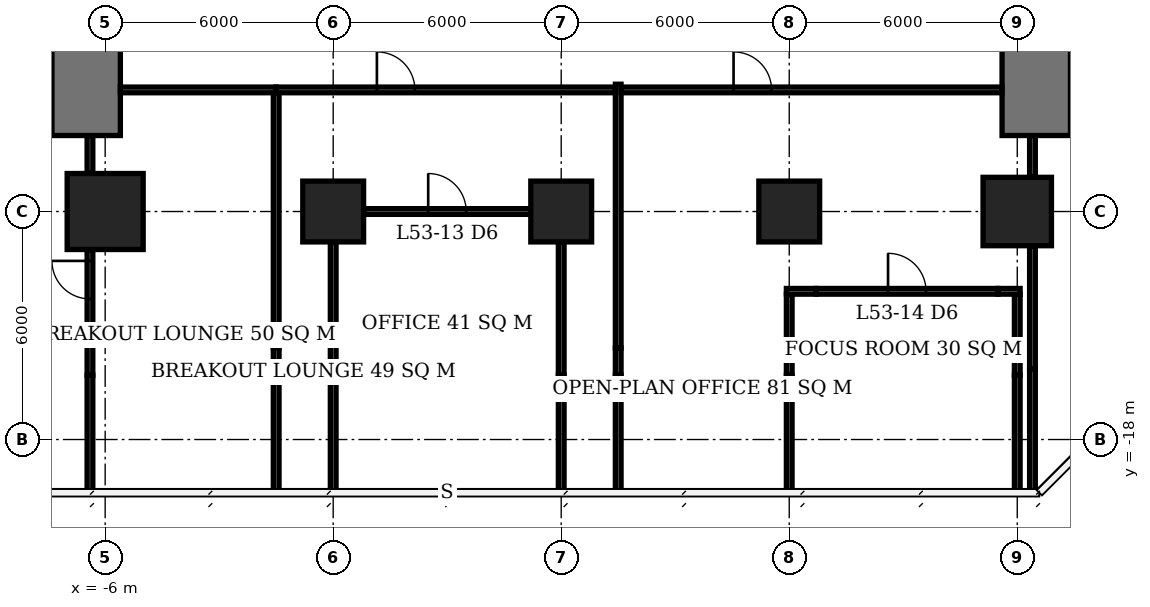
"""IFC4 building model, lengths in metres.
Left out: names, types, materials, properties, quantities, classifications, styles, units other than length and angle.
Written with IfcOpenShell. Run it as: python <this file> out.ifc"""

import sys

from ifc_helpers import new_model, si_unit, direction, frame, frame_2d, origin, origin_2d, place, context, subcontext, project, spatial, rectangle, extrude, element, fill, save


model = new_model("IFC4")
c1 = context("Model", 3, precision=1e-05, world=origin(), true_north=direction((0.0, 1.0)))
c2 = subcontext(c1, "Body", "Model", "MODEL_VIEW")
j1 = project(units=[si_unit("LENGTHUNIT", "METRE"), si_unit("PLANEANGLEUNIT", "RADIAN")], contexts=[c1])
p1 = place(None, origin())
s1 = spatial("IfcSite", under=j1, at=p1, CompositionType="ELEMENT")
p2 = place(p1, origin())
s2 = spatial("IfcBuilding", under=s1, at=p2, CompositionType="ELEMENT")
p3 = place(p2, frame((0.0, 0.0, 216.2)))
s3 = spatial("IfcBuildingStorey", under=s2, at=p3, CompositionType="ELEMENT", Elevation=216.2)
p4 = place(p3, frame((-6.0, -12.0, 0.0), z_axis=(0.0, 0.0, 1.0), x_axis=(1.0, 0.0, 0.0)))
e1 = element("IfcColumn", 1, at=p4, inside=s3, PredefinedType="COLUMN", context=c2, shape_type="SweptSolid", body=[
    extrude(rectangle(XDim=2.0, YDim=2.0, at=origin_2d()), origin(), (0.0, 0.0, 1.0), 3.9),
])
for number, where, z_axis, x_axis in (
    (2, (0.0, -12.0, 0.0), (0.0, 0.0, 1.0), (1.0, 0.0, 0.0)),
    (3, (6.0, -12.0, 0.0), (0.0, 0.0, 1.0), (1.0, 0.0, 0.0)),
    (4, (12.0, -12.0, 0.0), (0.0, 0.0, 1.0), (1.0, 0.0, 0.0)),
):
    element("IfcColumn", number, at=place(p3, frame(where, z_axis=z_axis, x_axis=x_axis)), inside=s3, PredefinedType="COLUMN", context=c2, shape_type="SweptSolid", body=[
        extrude(rectangle(XDim=1.6, YDim=1.6, at=origin_2d()), origin(), (0.0, 0.0, 1.0), 3.9),
    ])
p5 = place(p3, frame((18.0, -12.0, 0.0), z_axis=(0.0, 0.0, 1.0), x_axis=(1.0, 0.0, 0.0)))
e5 = element("IfcColumn", 5, at=p5, inside=s3, PredefinedType="COLUMN", context=c2, shape_type="SweptSolid", body=[
    extrude(rectangle(XDim=1.8, YDim=1.8, at=origin_2d()), origin(), (0.0, 0.0, 1.0), 3.9),
])
for number, where, z_axis, x_axis in (
    (6, (-6.5, -10.0, 0.0), (0.0, 0.0, 1.0), (0.0, 1.0, 0.0)),
    (7, (18.5, -10.0, 0.0), (0.0, 0.0, 1.0), (0.0, 1.0, 0.0)),
):
    element("IfcWall", number, at=place(p3, frame(where, z_axis=z_axis, x_axis=x_axis)), inside=s3, PredefinedType="SHEAR", context=c2, shape_type="SweptSolid", body=[
        extrude(rectangle(XDim=2.4, YDim=1.8, at=frame_2d((1.2, 0.0))), origin(), (0.0, 0.0, 1.0), 3.9),
    ])
p6 = place(p3, frame((11.925, -14.1, 0.0), z_axis=(0.0, 0.0, 1.0), x_axis=(1.0, 0.0, 0.0)))
e8 = element("IfcWall", 8, at=p6, inside=s3, PredefinedType="PARTITIONING", context=c2, shape_type="SweptSolid", body=[
    extrude(rectangle(XDim=0.785, YDim=0.15, at=frame_2d((0.393, 0.0))), origin(), (0.0, 0.0, 1.0), 2.65),
])
p7 = place(p3, frame((12.71, -14.1, 0.0), z_axis=(0.0, 0.0, 1.0), x_axis=(1.0, 0.0, 0.0)))
e9 = element("IfcWall", 9, at=p7, inside=s3, PredefinedType="PARTITIONING", context=c2, shape_type="SweptSolid", body=[
    extrude(rectangle(XDim=4.78, YDim=0.15, at=frame_2d((2.39, 0.0))), origin(), (0.0, 0.0, 1.0), 3.65),
])
p8 = place(p7, frame((1.89, 0.0, 0.0)))
e10 = element("IfcOpeningElement", 10, at=p8, cuts=e9, PredefinedType="OPENING", context=c2, shape_type="SweptSolid", body=[
    extrude(rectangle(XDim=1.0, YDim=2.1, at=frame_2d((0.5, 1.05))), frame((0.0, 0.085, 0.0), z_axis=(0.0, -1.0, 0.0), x_axis=(1.0, 0.0, 0.0)), (0.0, 0.0, 1.0), 0.17),
])
p9 = place(p3, frame((17.49, -14.1, 0.0), z_axis=(0.0, 0.0, 1.0), x_axis=(1.0, 0.0, 0.0)))
e11 = element("IfcWall", 11, at=p9, inside=s3, PredefinedType="PARTITIONING", context=c2, shape_type="SweptSolid", body=[
    extrude(rectangle(XDim=0.585, YDim=0.15, at=frame_2d((0.292, 0.0))), origin(), (0.0, 0.0, 1.0), 2.65),
])
p10 = place(p3, frame((0.8, -12.0, 0.0), z_axis=(0.0, 0.0, 1.0), x_axis=(1.0, 0.0, 0.0)))
e12 = element("IfcWall", 12, at=p10, inside=s3, PredefinedType="PARTITIONING", context=c2, shape_type="SweptSolid", body=[
    extrude(rectangle(XDim=4.4, YDim=0.15, at=frame_2d((2.2, 0.0))), origin(), (0.0, 0.0, 1.0), 3.65),
])
p11 = place(p10, frame((1.7, 0.0, 0.0)))
e13 = element("IfcOpeningElement", 13, at=p11, cuts=e12, PredefinedType="OPENING", context=c2, shape_type="SweptSolid", body=[
    extrude(rectangle(XDim=1.0, YDim=2.1, at=frame_2d((0.5, 1.05))), frame((0.0, 0.085, 0.0), z_axis=(0.0, -1.0, 0.0), x_axis=(1.0, 0.0, 0.0)), (0.0, 0.0, 1.0), 0.17),
])
p12 = place(p3, frame((0.0, -19.35, 0.0), z_axis=(0.0, 0.0, 1.0), x_axis=(0.0, 1.0, 0.0)))
e14 = element("IfcWall", 14, at=p12, inside=s3, PredefinedType="PARTITIONING", context=c2, shape_type="SweptSolid", body=[
    extrude(rectangle(XDim=3.04, YDim=0.15, at=frame_2d((1.52, 0.0))), origin(), (0.0, 0.0, 1.0), 3.65),
])
p13 = place(p3, frame((0.0, -16.31, 0.0), z_axis=(0.0, 0.0, 1.0), x_axis=(0.0, 1.0, 0.0)))
e15 = element("IfcWall", 15, at=p13, inside=s3, PredefinedType="PARTITIONING", context=c2, shape_type="SweptSolid", body=[
    extrude(rectangle(XDim=3.51, YDim=0.15, at=frame_2d((1.755, 0.0))), origin(), (0.0, 0.0, 1.0), 2.65),
])
p14 = place(p3, frame((6.0, -19.35, 0.0), z_axis=(0.0, 0.0, 1.0), x_axis=(0.0, 1.0, 0.0)))
e16 = element("IfcWall", 16, at=p14, inside=s3, PredefinedType="PARTITIONING", context=c2, shape_type="SweptSolid", body=[
    extrude(rectangle(XDim=3.04, YDim=0.15, at=frame_2d((1.52, 0.0))), origin(), (0.0, 0.0, 1.0), 3.65),
])
p15 = place(p3, frame((6.0, -16.31, 0.0), z_axis=(0.0, 0.0, 1.0), x_axis=(0.0, 1.0, 0.0)))
e17 = element("IfcWall", 17, at=p15, inside=s3, PredefinedType="PARTITIONING", context=c2, shape_type="SweptSolid", body=[
    extrude(rectangle(XDim=3.51, YDim=0.15, at=frame_2d((1.755, 0.0))), origin(), (0.0, 0.0, 1.0), 2.65),
])
p16 = place(p3, frame((12.0, -19.4, 0.0), z_axis=(0.0, 0.0, 1.0), x_axis=(0.0, 1.0, 0.0)))
e18 = element("IfcWall", 18, at=p16, inside=s3, PredefinedType="PARTITIONING", context=c2, shape_type="SweptSolid", body=[
    extrude(rectangle(XDim=3.09, YDim=0.15, at=frame_2d((1.545, 0.0))), origin(), (0.0, 0.0, 1.0), 3.65),
])
p17 = place(p3, frame((12.0, -16.31, 0.0), z_axis=(0.0, 0.0, 1.0), x_axis=(0.0, 1.0, 0.0)))
e19 = element("IfcWall", 19, at=p17, inside=s3, PredefinedType="PARTITIONING", context=c2, shape_type="SweptSolid", body=[
    extrude(rectangle(XDim=2.135, YDim=0.15, at=frame_2d((1.067, 0.0))), origin(), (0.0, 0.0, 1.0), 2.65),
])
p18 = place(p3, frame((18.0, -19.4, 0.0), z_axis=(0.0, 0.0, 1.0), x_axis=(0.0, 1.0, 0.0)))
e20 = element("IfcWall", 20, at=p18, inside=s3, PredefinedType="PARTITIONING", context=c2, shape_type="SweptSolid", body=[
    extrude(rectangle(XDim=3.09, YDim=0.15, at=frame_2d((1.545, 0.0))), origin(), (0.0, 0.0, 1.0), 3.65),
])
p19 = place(p3, frame((18.0, -16.31, 0.0), z_axis=(0.0, 0.0, 1.0), x_axis=(0.0, 1.0, 0.0)))
e21 = element("IfcWall", 21, at=p19, inside=s3, PredefinedType="PARTITIONING", context=c2, shape_type="SweptSolid", body=[
    extrude(rectangle(XDim=2.135, YDim=0.15, at=frame_2d((1.067, 0.0))), origin(), (0.0, 0.0, 1.0), 2.65),
])
p20 = place(p3, frame((-6.4, -19.35, 0.0), z_axis=(0.0, 0.0, 1.0), x_axis=(0.0, 1.0, 0.0)))
e22 = element("IfcWall", 22, at=p20, inside=s3, PredefinedType="PARTITIONING", context=c2, shape_type="SweptSolid", body=[
    extrude(rectangle(XDim=3.04, YDim=0.15, at=frame_2d((1.52, 0.0))), origin(), (0.0, 0.0, 1.0), 3.65),
])
p21 = place(p3, frame((-6.4, -16.31, 0.0), z_axis=(0.0, 0.0, 1.0), x_axis=(0.0, 1.0, 0.0)))
e23 = element("IfcWall", 23, at=p21, inside=s3, PredefinedType="PARTITIONING", context=c2, shape_type="SweptSolid", body=[
    extrude(rectangle(XDim=3.31, YDim=0.15, at=frame_2d((1.655, 0.0))), origin(), (0.0, 0.0, 1.0), 2.65),
])
p22 = place(p21, frame((2.01, 0.0, 0.0)))
e24 = element("IfcOpeningElement", 24, at=p22, cuts=e23, PredefinedType="OPENING", context=c2, shape_type="SweptSolid", body=[
    extrude(rectangle(XDim=1.0, YDim=2.1, at=frame_2d((0.5, 1.05))), frame((0.0, 0.085, 0.0), z_axis=(0.0, -1.0, 0.0), x_axis=(1.0, 0.0, 0.0)), (0.0, 0.0, 1.0), 0.17),
])
p23 = place(p3, frame((-6.4, -11.0, 0.0), z_axis=(0.0, 0.0, 1.0), x_axis=(0.0, 1.0, 0.0)))
e25 = element("IfcWall", 25, at=p23, inside=s3, PredefinedType="PARTITIONING", context=c2, shape_type="SweptSolid", body=[
    extrude(rectangle(XDim=1.0, YDim=0.15, at=frame_2d((0.5, 0.0))), origin(), (0.0, 0.0, 1.0), 3.65),
])
p24 = place(p3, frame((-5.6, -8.8, 0.0), z_axis=(0.0, 0.0, 1.0), x_axis=(1.0, 0.0, 0.0)))
e26 = element("IfcWall", 26, at=p24, inside=s3, PredefinedType="PARTITIONING", context=c2, shape_type="SweptSolid", body=[
    extrude(rectangle(XDim=4.1, YDim=0.15, at=frame_2d((2.05, 0.0))), origin(), (0.0, 0.0, 1.0), 3.65),
])
p25 = place(p3, frame((-1.5, -19.4, 0.0), z_axis=(0.0, 0.0, 1.0), x_axis=(0.0, 1.0, 0.0)))
e27 = element("IfcWall", 27, at=p25, inside=s3, PredefinedType="PARTITIONING", context=c2, shape_type="SweptSolid", body=[
    extrude(rectangle(XDim=3.09, YDim=0.15, at=frame_2d((1.545, 0.0))), origin(), (0.0, 0.0, 1.0), 3.65),
])
p26 = place(p3, frame((-1.5, -16.31, 0.0), z_axis=(0.0, 0.0, 1.0), x_axis=(0.0, 1.0, 0.0)))
e28 = element("IfcWall", 28, at=p26, inside=s3, PredefinedType="PARTITIONING", context=c2, shape_type="SweptSolid", body=[
    extrude(rectangle(XDim=0.72, YDim=0.15, at=frame_2d((0.36, 0.0))), origin(), (0.0, 0.0, 1.0), 2.65),
])
p27 = place(p3, frame((-1.5, -15.59, 0.0), z_axis=(0.0, 0.0, 1.0), x_axis=(0.0, 1.0, 0.0)))
e29 = element("IfcWall", 29, at=p27, inside=s3, PredefinedType="PARTITIONING", context=c2, shape_type="SweptSolid", body=[
    extrude(rectangle(XDim=6.715, YDim=0.15, at=frame_2d((3.357, 0.0))), origin(), (0.0, 0.0, 1.0), 3.65),
])
p28 = place(p3, frame((-1.5, -8.8, 0.0), z_axis=(0.0, 0.0, 1.0), x_axis=(1.0, 0.0, 0.0)))
e30 = element("IfcWall", 30, at=p28, inside=s3, PredefinedType="PARTITIONING", context=c2, shape_type="SweptSolid", body=[
    extrude(rectangle(XDim=8.925, YDim=0.15, at=frame_2d((4.462, 0.0))), origin(), (0.0, 0.0, 1.0), 3.65),
])
p29 = place(p28, frame((2.65, 0.0, 0.0)))
e31 = element("IfcOpeningElement", 31, at=p29, cuts=e30, PredefinedType="OPENING", context=c2, shape_type="SweptSolid", body=[
    extrude(rectangle(XDim=1.0, YDim=2.1, at=frame_2d((0.5, 1.05))), frame((0.0, 0.085, 0.0), z_axis=(0.0, -1.0, 0.0), x_axis=(1.0, 0.0, 0.0)), (0.0, 0.0, 1.0), 0.17),
])
p30 = place(p3, frame((7.5, -19.4, 0.0), z_axis=(0.0, 0.0, 1.0), x_axis=(0.0, 1.0, 0.0)))
e32 = element("IfcWall", 32, at=p30, inside=s3, PredefinedType="PARTITIONING", context=c2, shape_type="SweptSolid", body=[
    extrude(rectangle(XDim=3.09, YDim=0.15, at=frame_2d((1.545, 0.0))), origin(), (0.0, 0.0, 1.0), 3.65),
])
p31 = place(p3, frame((7.5, -16.31, 0.0), z_axis=(0.0, 0.0, 1.0), x_axis=(0.0, 1.0, 0.0)))
e33 = element("IfcWall", 33, at=p31, inside=s3, PredefinedType="PARTITIONING", context=c2, shape_type="SweptSolid", body=[
    extrude(rectangle(XDim=0.72, YDim=0.15, at=frame_2d((0.36, 0.0))), origin(), (0.0, 0.0, 1.0), 2.65),
])
p32 = place(p3, frame((7.5, -15.59, 0.0), z_axis=(0.0, 0.0, 1.0), x_axis=(0.0, 1.0, 0.0)))
e34 = element("IfcWall", 34, at=p32, inside=s3, PredefinedType="PARTITIONING", context=c2, shape_type="SweptSolid", body=[
    extrude(rectangle(XDim=6.94, YDim=0.15, at=frame_2d((3.47, 0.0))), origin(), (0.0, 0.0, 1.0), 3.65),
])
p33 = place(p3, frame((7.575, -8.8, 0.0), z_axis=(0.0, 0.0, 1.0), x_axis=(1.0, 0.0, 0.0)))
e35 = element("IfcWall", 35, at=p33, inside=s3, PredefinedType="PARTITIONING", context=c2, shape_type="SweptSolid", body=[
    extrude(rectangle(XDim=10.025, YDim=0.15, at=frame_2d((5.013, 0.0))), origin(), (0.0, 0.0, 1.0), 3.65),
])
p34 = place(p33, frame((2.96, 0.0, 0.0)))
e36 = element("IfcOpeningElement", 36, at=p34, cuts=e35, PredefinedType="OPENING", context=c2, shape_type="SweptSolid", body=[
    extrude(rectangle(XDim=1.0, YDim=2.1, at=frame_2d((0.5, 1.05))), frame((0.0, 0.085, 0.0), z_axis=(0.0, -1.0, 0.0), x_axis=(1.0, 0.0, 0.0)), (0.0, 0.0, 1.0), 0.17),
])
p35 = place(p3, frame((18.4, -19.4, 0.0), z_axis=(0.0, 0.0, 1.0), x_axis=(0.0, 1.0, 0.0)))
e37 = element("IfcWall", 37, at=p35, inside=s3, PredefinedType="PARTITIONING", context=c2, shape_type="SweptSolid", body=[
    extrude(rectangle(XDim=3.26, YDim=0.15, at=frame_2d((1.63, 0.0))), origin(), (0.0, 0.0, 1.0), 3.65),
])
p36 = place(p3, frame((18.4, -16.14, 0.0), z_axis=(0.0, 0.0, 1.0), x_axis=(0.0, 1.0, 0.0)))
e38 = element("IfcWall", 38, at=p36, inside=s3, PredefinedType="PARTITIONING", context=c2, shape_type="SweptSolid", body=[
    extrude(rectangle(XDim=3.24, YDim=0.15, at=frame_2d((1.62, 0.0))), origin(), (0.0, 0.0, 1.0), 2.65),
])
p37 = place(p3, frame((18.4, -11.1, 0.0), z_axis=(0.0, 0.0, 1.0), x_axis=(0.0, 1.0, 0.0)))
e39 = element("IfcWall", 39, at=p37, inside=s3, PredefinedType="PARTITIONING", context=c2, shape_type="SweptSolid", body=[
    extrude(rectangle(XDim=1.1, YDim=0.15, at=frame_2d((0.55, 0.0))), origin(), (0.0, 0.0, 1.0), 3.65),
])
p38 = place(p11, origin())
e40 = element("IfcDoor", 40, at=p38, inside=s3, OperationType="SINGLE_SWING_LEFT", PredefinedType="DOOR", context=c2, shape_type="SweptSolid", body=[
    extrude(rectangle(XDim=1.0, YDim=2.1, at=frame_2d((0.5, 1.05))), frame((0.0, 0.025, 0.0), z_axis=(0.0, -1.0, 0.0), x_axis=(1.0, 0.0, 0.0)), (0.0, 0.0, 1.0), 0.05),
])
fill(e13, e40)
p39 = place(p8, origin())
e41 = element("IfcDoor", 41, at=p39, inside=s3, OperationType="SINGLE_SWING_LEFT", PredefinedType="DOOR", context=c2, shape_type="SweptSolid", body=[
    extrude(rectangle(XDim=1.0, YDim=2.1, at=frame_2d((0.5, 1.05))), frame((0.0, 0.025, 0.0), z_axis=(0.0, -1.0, 0.0), x_axis=(1.0, 0.0, 0.0)), (0.0, 0.0, 1.0), 0.05),
])
fill(e10, e41)
p40 = place(p22, origin())
e42 = element("IfcDoor", 42, at=p40, inside=s3, OperationType="SINGLE_SWING_RIGHT", PredefinedType="DOOR", context=c2, shape_type="SweptSolid", body=[
    extrude(rectangle(XDim=1.0, YDim=2.1, at=frame_2d((0.5, 1.05))), frame((0.0, 0.025, 0.0), z_axis=(0.0, -1.0, 0.0), x_axis=(1.0, 0.0, 0.0)), (0.0, 0.0, 1.0), 0.05),
])
fill(e24, e42)
p41 = place(p34, origin())
e43 = element("IfcDoor", 43, at=p41, inside=s3, OperationType="SINGLE_SWING_LEFT", PredefinedType="DOOR", context=c2, shape_type="SweptSolid", body=[
    extrude(rectangle(XDim=1.0, YDim=2.1, at=frame_2d((0.5, 1.05))), frame((0.0, 0.025, 0.0), z_axis=(0.0, -1.0, 0.0), x_axis=(1.0, 0.0, 0.0)), (0.0, 0.0, 1.0), 0.05),
])
fill(e36, e43)
p42 = place(p29, origin())
e44 = element("IfcDoor", 44, at=p42, inside=s3, OperationType="SINGLE_SWING_LEFT", PredefinedType="DOOR", context=c2, shape_type="SweptSolid", body=[
    extrude(rectangle(XDim=1.0, YDim=2.1, at=frame_2d((0.5, 1.05))), frame((0.0, 0.025, 0.0), z_axis=(0.0, -1.0, 0.0), x_axis=(1.0, 0.0, 0.0)), (0.0, 0.0, 1.0), 0.05),
])
fill(e31, e44)
save(model, sys.argv[1])
